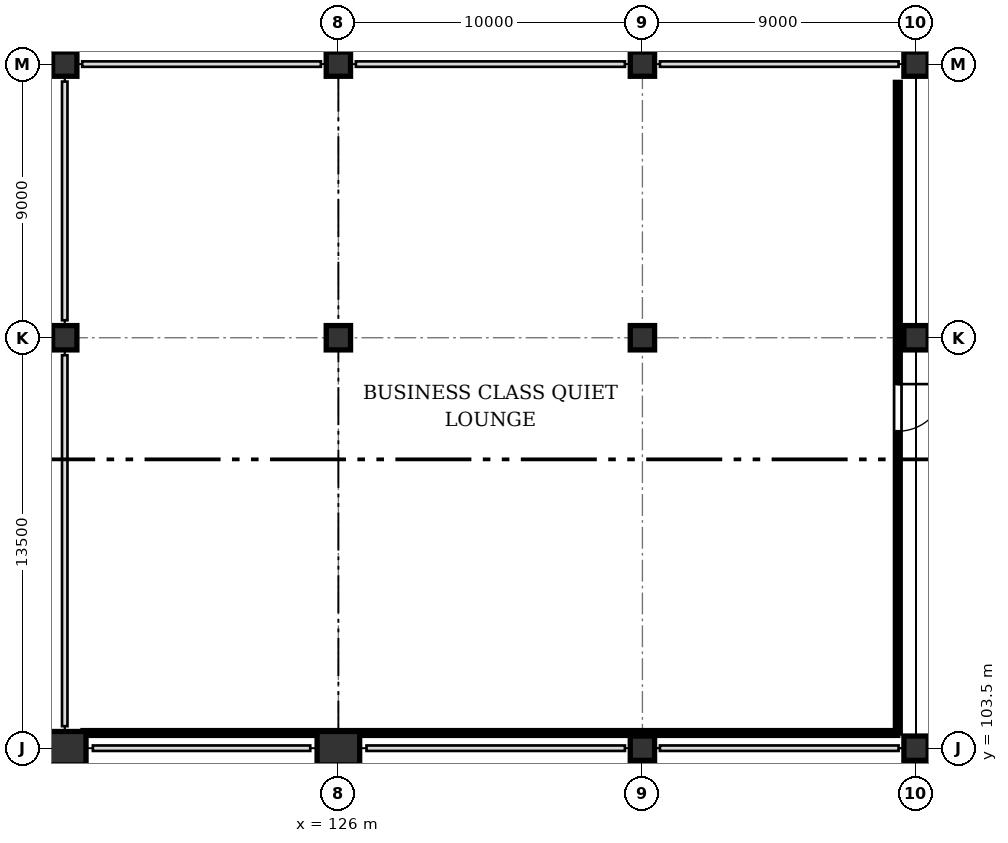
"""IFC4 building model, lengths in metres.
Left out: names, types, materials, properties, quantities, classifications, styles, units other than length and angle.
Written with IfcOpenShell. Run it as: python <this file> out.ifc"""

import sys

from ifc_helpers import new_model, si_unit, direction, frame, frame_2d, origin, origin_2d, place, context, subcontext, project, spatial, rectangle, extrude, element, fill, save


model = new_model("IFC4")
c1 = context("Model", 3, precision=1e-05, world=origin(), true_north=direction((0.0, 1.0)))
c2 = subcontext(c1, "Body", "Model", "MODEL_VIEW")
j1 = project(units=[si_unit("LENGTHUNIT", "METRE"), si_unit("PLANEANGLEUNIT", "RADIAN")], contexts=[c1])
p1 = place(None, origin())
s1 = spatial("IfcSite", under=j1, at=p1, CompositionType="ELEMENT")
p2 = place(p1, origin())
s2 = spatial("IfcBuilding", under=s1, at=p2, CompositionType="ELEMENT")
p3 = place(p2, frame((0.0, 0.0, 6.6)))
s3 = spatial("IfcBuildingStorey", under=s2, at=p3, CompositionType="ELEMENT", Elevation=6.6)
p4 = place(p3, frame((117.0, 103.5, 0.0), z_axis=(0.0, 0.0, 1.0), x_axis=(1.0, 0.0, 0.0)))
e1 = element("IfcColumn", 1, at=p4, inside=s3, PredefinedType="COLUMN", context=c2, shape_type="SweptSolid", body=[
    extrude(rectangle(XDim=1.4, YDim=1.1, at=origin_2d()), origin(), (0.0, 0.0, 1.0), 4.2),
])
for number, where, z_axis, x_axis in (
    (2, (117.0, 117.0, 0.0), (0.0, 0.0, 1.0), (1.0, 0.0, 0.0)),
    (3, (117.0, 126.0, 0.0), (0.0, 0.0, 1.0), (1.0, 0.0, 0.0)),
):
    element("IfcColumn", number, at=place(p3, frame(where, z_axis=z_axis, x_axis=x_axis)), inside=s3, PredefinedType="COLUMN", context=c2, shape_type="SweptSolid", body=[
        extrude(rectangle(XDim=0.8, YDim=0.8, at=origin_2d()), origin(), (0.0, 0.0, 1.0), 4.2),
    ])
p5 = place(p3, frame((126.0, 103.5, 0.0), z_axis=(0.0, 0.0, 1.0), x_axis=(1.0, 0.0, 0.0)))
e4 = element("IfcColumn", 4, at=p5, inside=s3, PredefinedType="COLUMN", context=c2, shape_type="SweptSolid", body=[
    extrude(rectangle(XDim=1.4, YDim=1.1, at=origin_2d()), origin(), (0.0, 0.0, 1.0), 4.2),
])
for number, where, z_axis, x_axis in (
    (5, (126.0, 117.0, 0.0), (0.0, 0.0, 1.0), (1.0, 0.0, 0.0)),
    (6, (126.0, 126.0, 0.0), (0.0, 0.0, 1.0), (1.0, 0.0, 0.0)),
    (7, (136.0, 103.5, 0.0), (0.0, 0.0, 1.0), (1.0, 0.0, 0.0)),
    (8, (136.0, 117.0, 0.0), (0.0, 0.0, 1.0), (1.0, 0.0, 0.0)),
    (9, (136.0, 126.0, 0.0), (0.0, 0.0, 1.0), (1.0, 0.0, 0.0)),
    (10, (145.0, 103.5, 0.0), (0.0, 0.0, 1.0), (1.0, 0.0, 0.0)),
    (11, (145.0, 117.0, 0.0), (0.0, 0.0, 1.0), (1.0, 0.0, 0.0)),
    (12, (145.0, 126.0, 0.0), (0.0, 0.0, 1.0), (1.0, 0.0, 0.0)),
):
    element("IfcColumn", number, at=place(p3, frame(where, z_axis=z_axis, x_axis=x_axis)), inside=s3, PredefinedType="COLUMN", context=c2, shape_type="SweptSolid", body=[
        extrude(rectangle(XDim=0.8, YDim=0.8, at=origin_2d()), origin(), (0.0, 0.0, 1.0), 4.2),
    ])
p6 = place(p3, frame((0.15, 125.85, 0.0), z_axis=(0.0, 0.0, 1.0), x_axis=(1.0, 0.0, 0.0)))
e13 = element("IfcWall", 13, at=p6, inside=s3, PredefinedType="PARAPET", context=c2, shape_type="SweptSolid", body=[
    extrude(rectangle(XDim=116.7, YDim=0.18, at=frame_2d((58.35, 0.0))), origin(), (0.0, 0.0, 1.0), 1.2),
])
p7 = place(p3, frame((136.15, 54.15, 0.0), z_axis=(0.0, 0.0, 1.0), x_axis=(0.0, 1.0, 0.0)))
e14 = element("IfcWall", 14, at=p7, inside=s3, PredefinedType="PARAPET", context=c2, shape_type="SweptSolid", body=[
    extrude(rectangle(XDim=49.2, YDim=0.18, at=frame_2d((24.6, 0.0))), origin(), (0.0, 0.0, 1.0), 1.2),
])
p8 = place(p3, frame((144.4, 104.0, 0.0), z_axis=(0.0, 0.0, 1.0), x_axis=(-1.0, 0.0, 0.0)))
e15 = element("IfcWall", 15, at=p8, inside=s3, PredefinedType="PARTITIONING", context=c2, shape_type="SweptSolid", body=[
    extrude(rectangle(XDim=26.8, YDim=0.16, at=frame_2d((13.4, 0.0))), origin(), (0.0, 0.0, 1.0), 3.355),
])
p9 = place(p3, frame((144.4, 125.4, 0.0), z_axis=(0.0, 0.0, 1.0), x_axis=(0.0, -1.0, 0.0)))
e16 = element("IfcWall", 16, at=p9, inside=s3, PredefinedType="PARTITIONING", context=c2, shape_type="SweptSolid", body=[
    extrude(rectangle(XDim=21.4, YDim=0.16, at=frame_2d((10.7, 0.0))), origin(), (0.0, 0.0, 1.0), 3.355),
])
p10 = place(p9, frame((9.925, 0.0, 0.0)))
e17 = element("IfcOpeningElement", 17, at=p10, cuts=e16, PredefinedType="OPENING", context=c2, shape_type="SweptSolid", body=[
    extrude(rectangle(XDim=1.55, YDim=2.1, at=frame_2d((0.775, 1.05))), frame((0.0, 0.09, 0.0), z_axis=(0.0, -1.0, 0.0), x_axis=(1.0, 0.0, 0.0)), (0.0, 0.0, 1.0), 0.18),
])
p11 = place(p10, origin())
e18 = element("IfcDoor", 18, at=p11, inside=s3, OperationType="SINGLE_SWING_LEFT", PredefinedType="DOOR", context=c2, shape_type="SweptSolid", body=[
    extrude(rectangle(XDim=1.55, YDim=2.1, at=frame_2d((0.775, 1.05))), frame((0.0, 0.025, 0.0), z_axis=(0.0, -1.0, 0.0), x_axis=(1.0, 0.0, 0.0)), (0.0, 0.0, 1.0), 0.05),
])
fill(e17, e18)
save(model, sys.argv[1])
